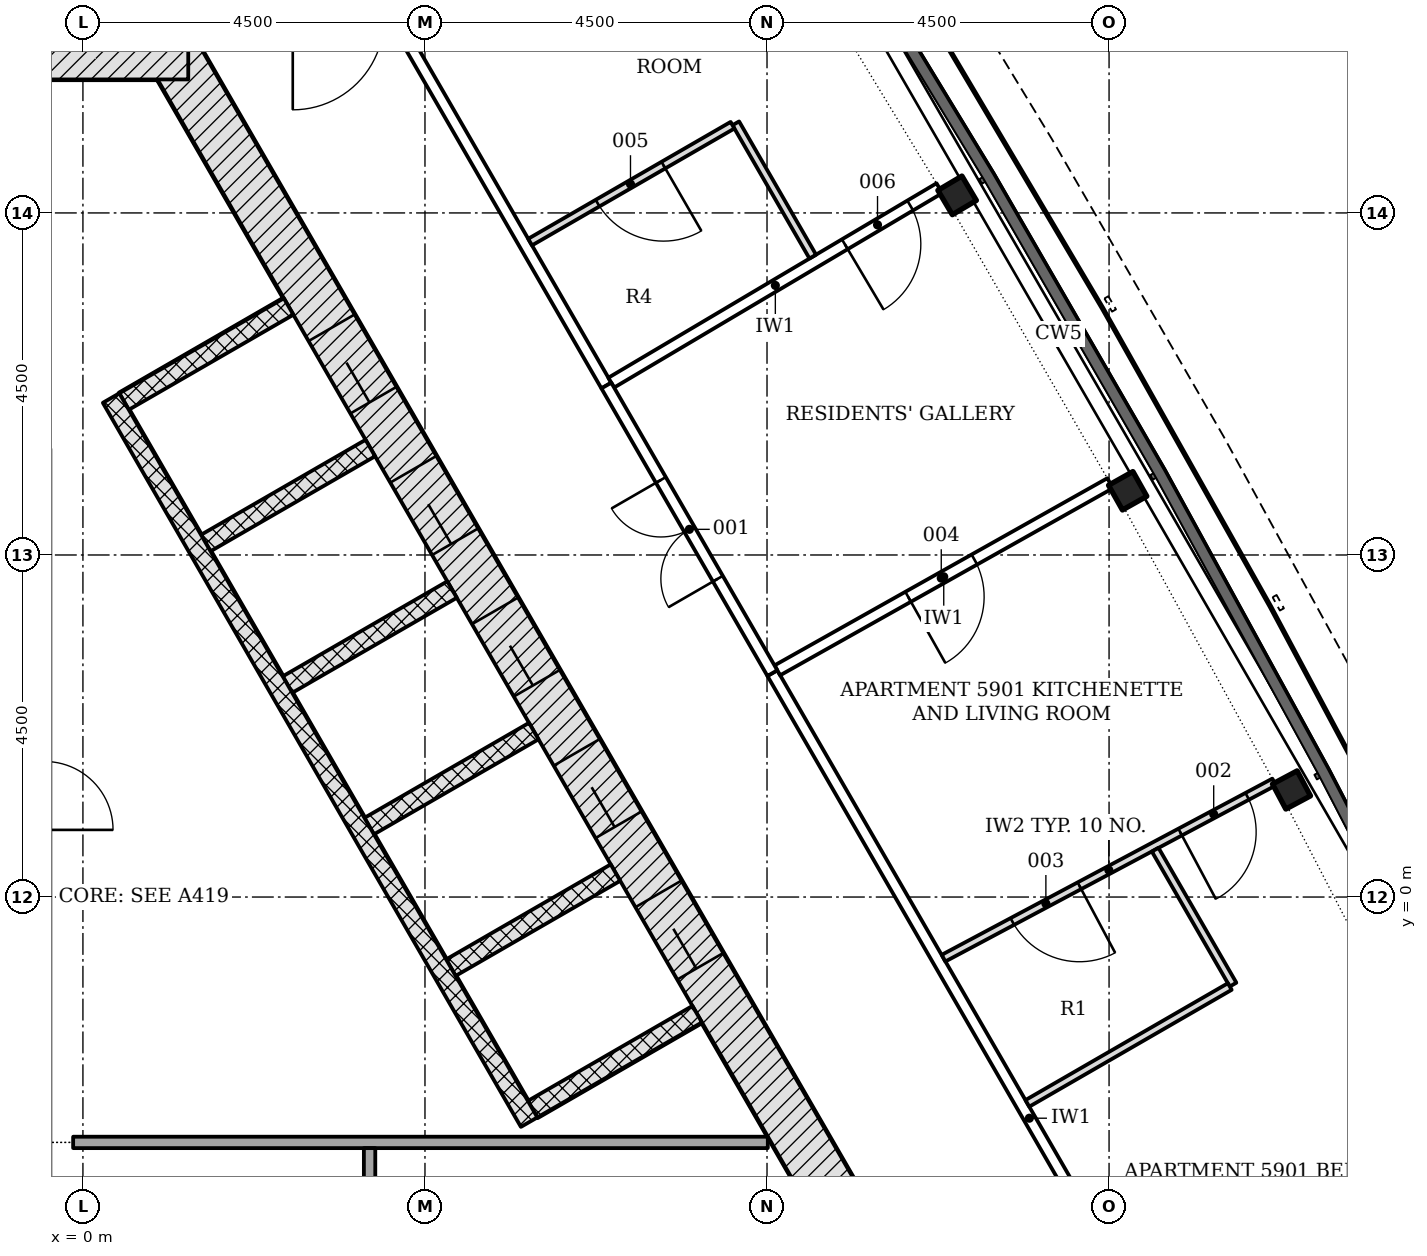
"""IFC4 building model, lengths in metres.
Left out: names, types, materials, properties, quantities, classifications, styles, units other than length and angle.
Written with IfcOpenShell. Run it as: python <this file> out.ifc"""

import sys

from ifc_helpers import new_model, si_unit, direction, frame, frame_2d, origin, origin_2d, place, context, subcontext, project, spatial, polyline, rectangle, i_section, outline, extrude, element, fill, save


model = new_model("IFC4")
c1 = context("Model", 3, precision=1e-05, world=origin(), true_north=direction((0.0, 1.0)))
c2 = subcontext(c1, "Body", "Model", "MODEL_VIEW")
j1 = project(units=[si_unit("LENGTHUNIT", "METRE"), si_unit("PLANEANGLEUNIT", "RADIAN")], contexts=[c1])
p1 = place(None, origin())
s1 = spatial("IfcSite", under=j1, at=p1, CompositionType="ELEMENT")
p2 = place(p1, origin())
s2 = spatial("IfcBuilding", under=s1, at=p2, CompositionType="ELEMENT")
p3 = place(p2, frame((0.0, 0.0, 229.2)))
s3 = spatial("IfcBuildingStorey", under=s2, at=p3, CompositionType="ELEMENT", Elevation=229.2)
p4 = place(p3, frame((10.311, -4.703, -0.2), z_axis=(0.0, 0.0, 1.0), x_axis=(-0.500001446645, 0.866024568562, 0.0)))
e1 = element("IfcWall", 1, at=p4, inside=s3, PredefinedType="SHEAR", context=c2, shape_type="SweptSolid", body=[
    extrude(rectangle(XDim=18.458, YDim=0.7, at=frame_2d((9.229, 0.0))), origin(), (0.0, 0.0, 1.0), 3.6),
])
p5 = place(p4, frame((4.379, 0.0, 0.2)))
e2 = element("IfcOpeningElement", 2, at=p5, cuts=e1, PredefinedType="OPENING", context=c2, shape_type="SweptSolid", body=[
    extrude(rectangle(XDim=1.1, YDim=2.1, at=frame_2d((0.55, 1.05))), frame((0.0, 0.36, 0.0), z_axis=(0.0, -1.0, 0.0), x_axis=(1.0, 0.0, 0.0)), (0.0, 0.0, 1.0), 0.72),
])
p6 = place(p4, frame((6.529, 0.0, 0.2)))
e3 = element("IfcOpeningElement", 3, at=p6, cuts=e1, PredefinedType="OPENING", context=c2, shape_type="SweptSolid", body=[
    extrude(rectangle(XDim=1.1, YDim=2.1, at=frame_2d((0.55, 1.05))), frame((0.0, 0.36, 0.0), z_axis=(0.0, -1.0, 0.0), x_axis=(1.0, 0.0, 0.0)), (0.0, 0.0, 1.0), 0.72),
])
p7 = place(p4, frame((8.679, 0.0, 0.2)))
e4 = element("IfcOpeningElement", 4, at=p7, cuts=e1, PredefinedType="OPENING", context=c2, shape_type="SweptSolid", body=[
    extrude(rectangle(XDim=1.1, YDim=2.1, at=frame_2d((0.55, 1.05))), frame((0.0, 0.36, 0.0), z_axis=(0.0, -1.0, 0.0), x_axis=(1.0, 0.0, 0.0)), (0.0, 0.0, 1.0), 0.72),
])
p8 = place(p4, frame((10.829, 0.0, 0.2)))
e5 = element("IfcOpeningElement", 5, at=p8, cuts=e1, PredefinedType="OPENING", context=c2, shape_type="SweptSolid", body=[
    extrude(rectangle(XDim=1.1, YDim=2.1, at=frame_2d((0.55, 1.05))), frame((0.0, 0.36, 0.0), z_axis=(0.0, -1.0, 0.0), x_axis=(1.0, 0.0, 0.0)), (0.0, 0.0, 1.0), 0.72),
])
p9 = place(p4, frame((12.979, 0.0, 0.2)))
e6 = element("IfcOpeningElement", 6, at=p9, cuts=e1, PredefinedType="OPENING", context=c2, shape_type="SweptSolid", body=[
    extrude(rectangle(XDim=1.1, YDim=2.1, at=frame_2d((0.55, 1.05))), frame((0.0, 0.36, 0.0), z_axis=(0.0, -1.0, 0.0), x_axis=(1.0, 0.0, 0.0)), (0.0, 0.0, 1.0), 0.72),
])
p10 = place(p3, frame((1.386, 11.106, -0.2), z_axis=(0.0, 0.0, 1.0), x_axis=(-1.0, 0.0, 0.0)))
e7 = element("IfcWall", 7, at=p10, inside=s3, PredefinedType="SHEAR", context=c2, shape_type="SweptSolid", body=[
    extrude(rectangle(XDim=2.771, YDim=0.7, at=frame_2d((1.386, 0.0))), origin(), (0.0, 0.0, 1.0), 3.6),
])
for number, where, z_axis, x_axis in (
    (8, (15.9, 1.409, -0.2), (0.0, 0.0, 1.0), (-0.47, 0.883, 0.0)),
    (9, (13.745, 5.345, -0.2), (0.0, 0.0, 1.0), (-0.49, 0.872, 0.0)),
    (10, (11.501, 9.231, -0.2), (0.0, 0.0, 1.0), (-0.51, 0.86, 0.0)),
):
    element("IfcColumn", number, at=place(p3, frame(where, z_axis=z_axis, x_axis=x_axis)), inside=s3, PredefinedType="COLUMN", context=c2, shape_type="SweptSolid", body=[
        extrude(i_section(OverallWidth=0.373, OverallDepth=0.368, WebThickness=0.015, FlangeThickness=0.024, FilletRadius=0.015, at=origin_2d()), origin(), (0.0, 0.0, 1.0), 3.6),
    ])
p11 = place(p3, origin())
e11 = element("IfcWall", 11, at=p11, inside=s3, PredefinedType="NOTDEFINED", context=c2, shape_type="SweptSolid", body=[
    extrude(outline(polyline([(11.244, -14.82), (14.364, -14.619), (15.772, -14.361), (17.092, -13.808), (18.261, -12.983), (19.227, -11.927), (19.942, -10.687), (20.375, -9.323), (20.504, -7.898), (20.323, -6.478), (19.842, -5.13), (18.457, -2.328), (18.188, -2.46), (19.565, -5.248), (20.03, -6.548), (20.202, -7.903), (20.079, -9.264), (19.666, -10.566), (18.983, -11.748), (18.062, -12.757), (16.945, -13.544), (15.686, -14.072), (14.327, -14.32), (11.225, -14.521), (11.244, -14.82)])), origin(), (0.0, 0.0, 1.0), 3.3),
])
for number, where, z_axis, x_axis in (
    (12, (8.081, -1.541, -0.2), (0.0, 0.0, 1.0), (-0.866, -0.5, 0.0)),
    (13, (7.006, 0.321, -0.2), (0.0, 0.0, 1.0), (-0.866, -0.5, 0.0)),
):
    element("IfcWall", number, at=place(p3, frame(where, z_axis=z_axis, x_axis=x_axis)), inside=s3, PredefinedType="PARTITIONING", context=c2, shape_type="SweptSolid", body=[
        extrude(rectangle(XDim=2.5, YDim=0.25, at=frame_2d((1.25, 0.0))), origin(), (0.0, 0.0, 1.0), 3.6),
    ])
p12 = place(p3, frame((5.931, 2.183, -0.2), z_axis=(0.0, 0.0, 1.0), x_axis=(-0.866047370643, -0.499961950354, 0.0)))
e14 = element("IfcWall", 14, at=p12, inside=s3, PredefinedType="PARTITIONING", context=c2, shape_type="SweptSolid", body=[
    extrude(rectangle(XDim=2.5, YDim=0.25, at=frame_2d((1.25, 0.0))), origin(), (0.0, 0.0, 1.0), 3.6),
])
for number, where, z_axis, x_axis in (
    (15, (4.856, 4.045, -0.2), (0.0, 0.0, 1.0), (-0.866, -0.5, 0.0)),
    (16, (3.781, 5.907, -0.2), (0.0, 0.0, 1.0), (-0.866, -0.5, 0.0)),
    (17, (2.706, 7.769, -0.2), (0.0, 0.0, 1.0), (-0.866, -0.5, 0.0)),
):
    element("IfcWall", number, at=place(p3, frame(where, z_axis=z_axis, x_axis=x_axis)), inside=s3, PredefinedType="PARTITIONING", context=c2, shape_type="SweptSolid", body=[
        extrude(rectangle(XDim=2.5, YDim=0.25, at=frame_2d((1.25, 0.0))), origin(), (0.0, 0.0, 1.0), 3.6),
    ])
p13 = place(p3, frame((5.87, -2.961, 0.0), z_axis=(0.0, 0.0, 1.0), x_axis=(-0.50000615651, 0.866021849293, 0.0)))
e18 = element("IfcWall", 18, at=p13, inside=s3, PredefinedType="PARTITIONING", context=c2, shape_type="SweptSolid", body=[
    extrude(rectangle(XDim=11.0, YDim=0.25, at=frame_2d((5.5, 0.0))), origin(), (0.0, 0.0, 1.0), 3.4),
])
p14 = place(p3, frame((-0.129, -3.228, 0.0), z_axis=(0.0, 0.0, 1.0), x_axis=(1.0, 0.0, 0.0)))
e19 = element("IfcWall", 19, at=p14, inside=s3, PredefinedType="PARTITIONING", context=c2, shape_type="SweptSolid", body=[
    extrude(rectangle(XDim=9.139, YDim=0.15, at=frame_2d((4.57, 0.0))), origin(), (0.0, 0.0, 1.0), 3.4),
])
p15 = place(p3, frame((3.771, -3.303, 0.0), z_axis=(0.0, 0.0, 1.0), x_axis=(0.0, -1.0, 0.0)))
e20 = element("IfcWall", 20, at=p15, inside=s3, PredefinedType="PARTITIONING", context=c2, shape_type="SweptSolid", body=[
    extrude(rectangle(XDim=2.925, YDim=0.15, at=frame_2d((1.462, 0.0))), origin(), (0.0, 0.0, 1.0), 3.4),
])
p16 = place(p3, frame((15.832, -8.765, 0.0), z_axis=(0.0, 0.0, 1.0), x_axis=(-0.500008967739, 0.866020226196, 0.0)))
e21 = element("IfcWall", 21, at=p16, inside=s3, PredefinedType="PARTITIONING", context=c2, shape_type="SweptSolid", body=[
    extrude(rectangle(XDim=13.523, YDim=0.15, at=frame_2d((6.761, 0.0))), origin(), (0.0, 0.0, 1.0), 2.852),
])
p17 = place(p3, frame((6.886, 6.729, 0.0), z_axis=(0.0, 0.0, 1.0), x_axis=(-0.4999966759, 0.866027322946, 0.0)))
e22 = element("IfcWall", 22, at=p17, inside=s3, PredefinedType="PARTITIONING", context=c2, shape_type="SweptSolid", body=[
    extrude(rectangle(XDim=5.343, YDim=0.15, at=frame_2d((2.672, 0.0))), origin(), (0.0, 0.0, 1.0), 2.852),
])
p18 = place(p3, frame((13.514, 5.444, 0.0), z_axis=(0.0, 0.0, 1.0), x_axis=(-0.871644326388, -0.490138927525, 0.0)))
e23 = element("IfcWall", 23, at=p18, inside=s3, PredefinedType="PARTITIONING", context=c2, shape_type="SweptSolid", body=[
    extrude(rectangle(XDim=5.023, YDim=0.15, at=frame_2d((2.511, 0.0))), origin(), (0.0, 0.0, 1.0), 3.4),
])
p19 = place(p18, frame((2.049, 0.0, 0.0)))
e24 = element("IfcOpeningElement", 24, at=p19, cuts=e23, PredefinedType="OPENING", context=c2, shape_type="SweptSolid", body=[
    extrude(rectangle(XDim=1.0, YDim=2.1, at=frame_2d((0.5, 1.05))), frame((0.0, 0.085, 0.0), z_axis=(0.0, -1.0, 0.0), x_axis=(1.0, 0.0, 0.0)), (0.0, 0.0, 1.0), 0.17),
])
p20 = place(p3, frame((11.268, 9.325, 0.0), z_axis=(0.0, 0.0, 1.0), x_axis=(-0.860287582295, -0.509809058128, 0.0)))
e25 = element("IfcWall", 25, at=p20, inside=s3, PredefinedType="PARTITIONING", context=c2, shape_type="SweptSolid", body=[
    extrude(rectangle(XDim=5.018, YDim=0.15, at=frame_2d((2.509, 0.0))), origin(), (0.0, 0.0, 1.0), 3.4),
])
p21 = place(p20, frame((0.447, 0.0, 0.0)))
e26 = element("IfcOpeningElement", 26, at=p21, cuts=e25, PredefinedType="OPENING", context=c2, shape_type="SweptSolid", body=[
    extrude(rectangle(XDim=1.0, YDim=2.1, at=frame_2d((0.5, 1.05))), frame((0.0, 0.085, 0.0), z_axis=(0.0, -1.0, 0.0), x_axis=(1.0, 0.0, 0.0)), (0.0, 0.0, 1.0), 0.17),
])
p22 = place(p3, frame((9.071, 2.946, 0.0), z_axis=(0.0, 0.0, 1.0), x_axis=(-0.499991738058, 0.866030173766, 0.0)))
e27 = element("IfcWall", 27, at=p22, inside=s3, PredefinedType="PARTITIONING", context=c2, shape_type="SweptSolid", body=[
    extrude(rectangle(XDim=4.369, YDim=0.15, at=frame_2d((2.184, 0.0))), origin(), (0.0, 0.0, 1.0), 2.852),
])
p23 = place(p22, frame((1.434, 0.0, 0.0)))
e28 = element("IfcOpeningElement", 28, at=p23, cuts=e27, PredefinedType="OPENING", context=c2, shape_type="SweptSolid", body=[
    extrude(rectangle(XDim=1.5, YDim=2.1, at=frame_2d((0.75, 1.05))), frame((0.0, 0.085, 0.0), z_axis=(0.0, -1.0, 0.0), x_axis=(1.0, 0.0, 0.0)), (0.0, 0.0, 1.0), 0.17),
])
p24 = place(p3, frame((15.672, 1.514, 0.0), z_axis=(0.0, 0.0, 1.0), x_axis=(-0.882503735513, -0.47030538675, 0.0)))
e29 = element("IfcWall", 29, at=p24, inside=s3, PredefinedType="PARTITIONING", context=c2, shape_type="SweptSolid", body=[
    extrude(rectangle(XDim=4.928, YDim=0.1, at=frame_2d((2.464, 0.0))), origin(), (0.0, 0.0, 1.0), 3.4),
])
p25 = place(p24, frame((0.401, 0.0, 0.0)))
e30 = element("IfcOpeningElement", 30, at=p25, cuts=e29, PredefinedType="OPENING", context=c2, shape_type="SweptSolid", body=[
    extrude(rectangle(XDim=1.0, YDim=2.1, at=frame_2d((0.5, 1.05))), frame((0.0, 0.06, 0.0), z_axis=(0.0, -1.0, 0.0), x_axis=(1.0, 0.0, 0.0)), (0.0, 0.0, 1.0), 0.12),
])
p26 = place(p24, frame((2.903, 0.0, 0.0)))
e31 = element("IfcOpeningElement", 31, at=p26, cuts=e29, PredefinedType="OPENING", context=c2, shape_type="SweptSolid", body=[
    extrude(rectangle(XDim=1.0, YDim=2.1, at=frame_2d((0.5, 1.05))), frame((0.0, 0.06, 0.0), z_axis=(0.0, -1.0, 0.0), x_axis=(1.0, 0.0, 0.0)), (0.0, 0.0, 1.0), 0.12),
])
p27 = place(p3, frame((14.107, 0.623, 0.0), z_axis=(0.0, 0.0, 1.0), x_axis=(0.499956128963, -0.866050731258, 0.0)))
e32 = element("IfcWall", 32, at=p27, inside=s3, PredefinedType="PARTITIONING", context=c2, shape_type="SweptSolid", body=[
    extrude(rectangle(XDim=2.05, YDim=0.1, at=frame_2d((1.025, 0.0))), origin(), (0.0, 0.0, 1.0), 2.852),
])
p28 = place(p3, frame((15.088, -1.177, 0.0), z_axis=(0.0, 0.0, 1.0), x_axis=(-0.866016353143, -0.500015675843, 0.0)))
e33 = element("IfcWall", 33, at=p28, inside=s3, PredefinedType="PARTITIONING", context=c2, shape_type="SweptSolid", body=[
    extrude(rectangle(XDim=3.075, YDim=0.1, at=frame_2d((1.538, 0.0))), origin(), (0.0, 0.0, 1.0), 3.4),
])
p29 = place(p3, frame((9.602, 8.425, 0.0), z_axis=(0.0, 0.0, 1.0), x_axis=(-0.500080744026, 0.86597878118, 0.0)))
e34 = element("IfcWall", 34, at=p29, inside=s3, PredefinedType="PARTITIONING", context=c2, shape_type="SweptSolid", body=[
    extrude(rectangle(XDim=2.025, YDim=0.1, at=frame_2d((1.013, 0.0))), origin(), (0.0, 0.0, 1.0), 3.4),
])
p30 = place(p3, frame((8.546, 10.154, 0.0), z_axis=(0.0, 0.0, 1.0), x_axis=(-0.866016353143, -0.500015675843, 0.0)))
e35 = element("IfcWall", 35, at=p30, inside=s3, PredefinedType="PARTITIONING", context=c2, shape_type="SweptSolid", body=[
    extrude(rectangle(XDim=3.075, YDim=0.1, at=frame_2d((1.538, 0.0))), origin(), (0.0, 0.0, 1.0), 3.4),
])
p31 = place(p30, frame((1.05, 0.0, 0.0)))
e36 = element("IfcOpeningElement", 36, at=p31, cuts=e35, PredefinedType="OPENING", context=c2, shape_type="SweptSolid", body=[
    extrude(rectangle(XDim=1.0, YDim=2.1, at=frame_2d((0.5, 1.05))), frame((0.0, 0.06, 0.0), z_axis=(0.0, -1.0, 0.0), x_axis=(1.0, 0.0, 0.0)), (0.0, 0.0, 1.0), 0.12),
])
p32 = place(p5, origin())
e37 = element("IfcDoor", 37, at=p32, inside=s3, OperationType="DOUBLE_DOOR_SLIDING", PredefinedType="DOOR", context=c2, shape_type="SweptSolid", body=[
    extrude(rectangle(XDim=1.1, YDim=2.1, at=frame_2d((0.55, 1.05))), frame((0.0, 0.025, 0.0), z_axis=(0.0, -1.0, 0.0), x_axis=(1.0, 0.0, 0.0)), (0.0, 0.0, 1.0), 0.05),
])
fill(e2, e37)
p33 = place(p6, origin())
e38 = element("IfcDoor", 38, at=p33, inside=s3, OperationType="DOUBLE_DOOR_SLIDING", PredefinedType="DOOR", context=c2, shape_type="SweptSolid", body=[
    extrude(rectangle(XDim=1.1, YDim=2.1, at=frame_2d((0.55, 1.05))), frame((0.0, 0.025, 0.0), z_axis=(0.0, -1.0, 0.0), x_axis=(1.0, 0.0, 0.0)), (0.0, 0.0, 1.0), 0.05),
])
fill(e3, e38)
p34 = place(p7, origin())
e39 = element("IfcDoor", 39, at=p34, inside=s3, OperationType="DOUBLE_DOOR_SLIDING", PredefinedType="DOOR", context=c2, shape_type="SweptSolid", body=[
    extrude(rectangle(XDim=1.1, YDim=2.1, at=frame_2d((0.55, 1.05))), frame((0.0, 0.025, 0.0), z_axis=(0.0, -1.0, 0.0), x_axis=(1.0, 0.0, 0.0)), (0.0, 0.0, 1.0), 0.05),
])
fill(e4, e39)
p35 = place(p8, origin())
e40 = element("IfcDoor", 40, at=p35, inside=s3, OperationType="DOUBLE_DOOR_SLIDING", PredefinedType="DOOR", context=c2, shape_type="SweptSolid", body=[
    extrude(rectangle(XDim=1.1, YDim=2.1, at=frame_2d((0.55, 1.05))), frame((0.0, 0.025, 0.0), z_axis=(0.0, -1.0, 0.0), x_axis=(1.0, 0.0, 0.0)), (0.0, 0.0, 1.0), 0.05),
])
fill(e5, e40)
p36 = place(p9, origin())
e41 = element("IfcDoor", 41, at=p36, inside=s3, OperationType="DOUBLE_DOOR_SLIDING", PredefinedType="DOOR", context=c2, shape_type="SweptSolid", body=[
    extrude(rectangle(XDim=1.1, YDim=2.1, at=frame_2d((0.55, 1.05))), frame((0.0, 0.025, 0.0), z_axis=(0.0, -1.0, 0.0), x_axis=(1.0, 0.0, 0.0)), (0.0, 0.0, 1.0), 0.05),
])
fill(e6, e41)
p37 = place(p23, origin())
e42 = element("IfcDoor", 42, at=p37, inside=s3, OperationType="DOUBLE_DOOR_SINGLE_SWING", PredefinedType="DOOR", context=c2, shape_type="SweptSolid", body=[
    extrude(rectangle(XDim=1.5, YDim=2.1, at=frame_2d((0.75, 1.05))), frame((0.0, 0.025, 0.0), z_axis=(0.0, -1.0, 0.0), x_axis=(1.0, 0.0, 0.0)), (0.0, 0.0, 1.0), 0.05),
])
fill(e28, e42)
p38 = place(p25, origin())
e43 = element("IfcDoor", 43, at=p38, inside=s3, OperationType="SINGLE_SWING_RIGHT", PredefinedType="DOOR", context=c2, shape_type="SweptSolid", body=[
    extrude(rectangle(XDim=1.0, YDim=2.1, at=frame_2d((0.5, 1.05))), frame((0.0, 0.025, 0.0), z_axis=(0.0, -1.0, 0.0), x_axis=(1.0, 0.0, 0.0)), (0.0, 0.0, 1.0), 0.05),
])
fill(e30, e43)
p39 = place(p26, origin())
e44 = element("IfcDoor", 44, at=p39, inside=s3, OperationType="SINGLE_SWING_LEFT", PredefinedType="DOOR", context=c2, shape_type="SweptSolid", body=[
    extrude(rectangle(XDim=1.0, YDim=2.1, at=frame_2d((0.5, 1.05))), frame((0.0, 0.025, 0.0), z_axis=(0.0, -1.0, 0.0), x_axis=(1.0, 0.0, 0.0)), (0.0, 0.0, 1.0), 0.05),
])
fill(e31, e44)
p40 = place(p19, origin())
e45 = element("IfcDoor", 45, at=p40, inside=s3, OperationType="SINGLE_SWING_RIGHT", PredefinedType="DOOR", context=c2, shape_type="SweptSolid", body=[
    extrude(rectangle(XDim=1.0, YDim=2.1, at=frame_2d((0.5, 1.05))), frame((0.0, 0.025, 0.0), z_axis=(0.0, -1.0, 0.0), x_axis=(1.0, 0.0, 0.0)), (0.0, 0.0, 1.0), 0.05),
])
fill(e24, e45)
p41 = place(p31, origin())
e46 = element("IfcDoor", 46, at=p41, inside=s3, OperationType="SINGLE_SWING_LEFT", PredefinedType="DOOR", context=c2, shape_type="SweptSolid", body=[
    extrude(rectangle(XDim=1.0, YDim=2.1, at=frame_2d((0.5, 1.05))), frame((0.0, 0.025, 0.0), z_axis=(0.0, -1.0, 0.0), x_axis=(1.0, 0.0, 0.0)), (0.0, 0.0, 1.0), 0.05),
])
fill(e36, e46)
p42 = place(p21, origin())
e47 = element("IfcDoor", 47, at=p42, inside=s3, OperationType="SINGLE_SWING_RIGHT", PredefinedType="DOOR", context=c2, shape_type="SweptSolid", body=[
    extrude(rectangle(XDim=1.0, YDim=2.1, at=frame_2d((0.5, 1.05))), frame((0.0, 0.025, 0.0), z_axis=(0.0, -1.0, 0.0), x_axis=(1.0, 0.0, 0.0)), (0.0, 0.0, 1.0), 0.05),
])
fill(e26, e47)
save(model, sys.argv[1])
